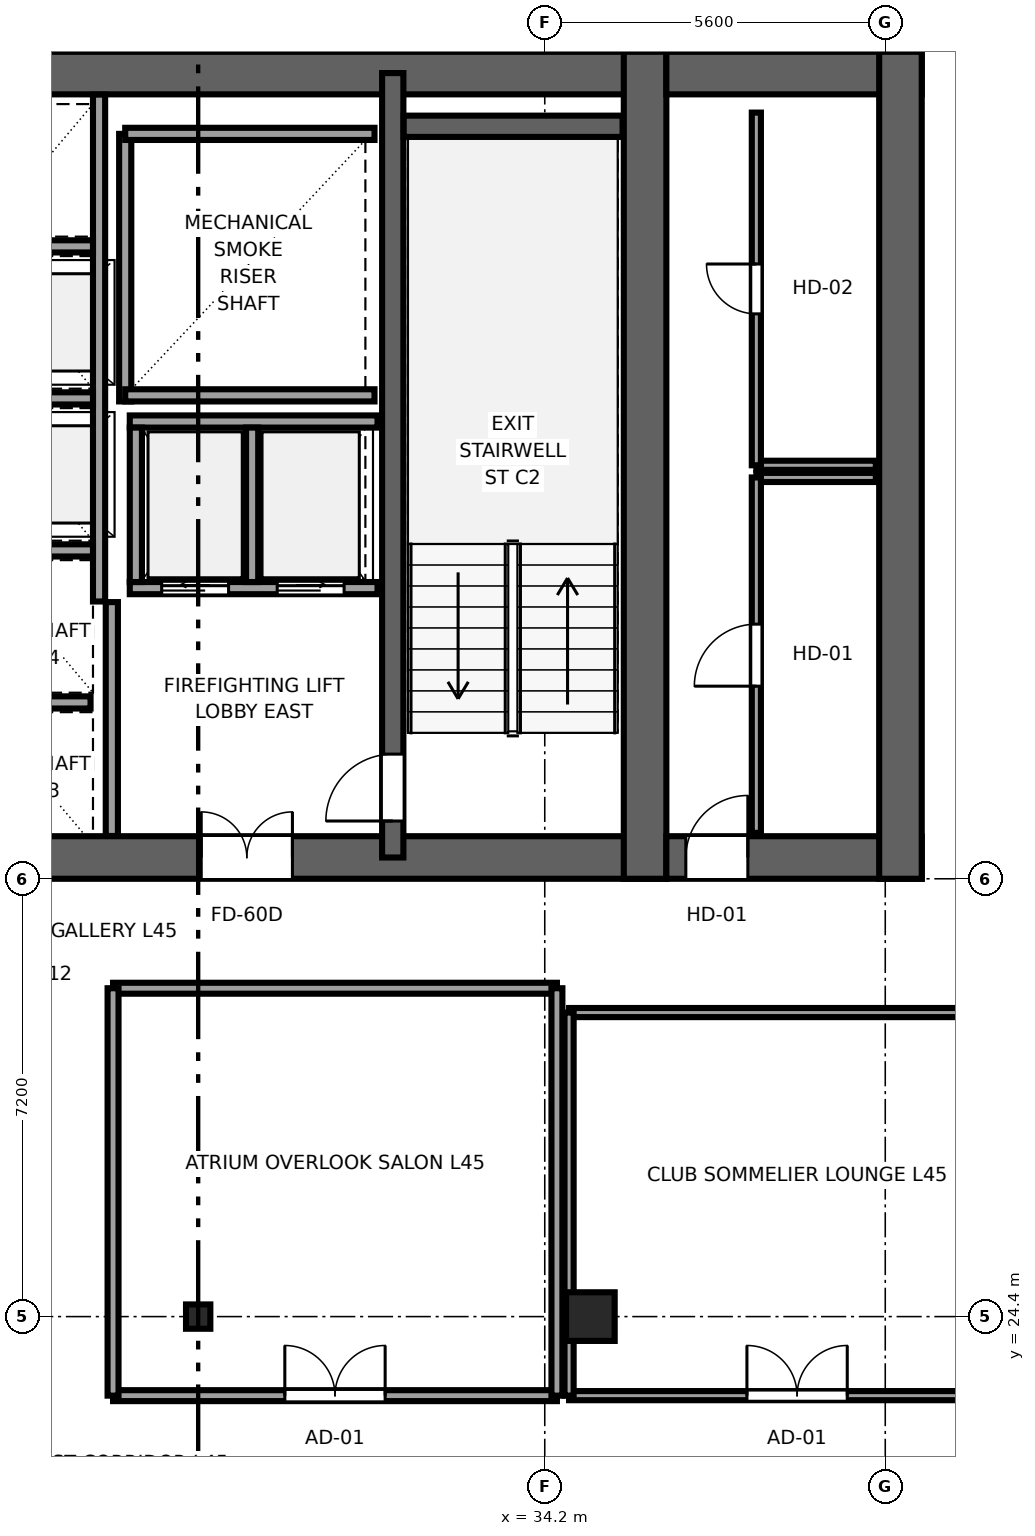
"""IFC4 building model, lengths in metres.
Left out: names, types, materials, properties, quantities, classifications, styles, units other than length and angle.
Written with IfcOpenShell. Run it as: python <this file> out.ifc"""

import sys

from ifc_helpers import new_model, si_unit, direction, frame, frame_2d, origin, origin_2d, place, context, subcontext, project, spatial, rectangle, i_section, extrude, source, transform, mapped, element, fill, save


model = new_model("IFC4")
c1 = context("Model", 3, precision=1e-05, world=origin(), true_north=direction((0.0, 1.0)))
c2 = subcontext(c1, "Body", "Model", "MODEL_VIEW")
j1 = project(units=[si_unit("LENGTHUNIT", "METRE"), si_unit("PLANEANGLEUNIT", "RADIAN")], contexts=[c1])
p1 = place(None, origin())
s1 = spatial("IfcSite", under=j1, at=p1, CompositionType="ELEMENT")
p2 = place(p1, origin())
s2 = spatial("IfcBuilding", under=s1, at=p2, CompositionType="ELEMENT")
p3 = place(p2, frame((0.0, 0.0, 171.9)))
s3 = spatial("IfcBuildingStorey", under=s2, at=p3, CompositionType="ELEMENT", Elevation=171.9)
p4 = place(p3, frame((9.8, 31.95, 0.0), z_axis=(0.0, 0.0, 1.0), x_axis=(1.0, 0.0, 0.0)))
e1 = element("IfcWall", 1, at=p4, inside=s3, PredefinedType="SHEAR", context=c2, shape_type="SweptSolid", body=[
    extrude(rectangle(XDim=26.4, YDim=0.7, at=frame_2d((13.2, 0.0))), origin(), (0.0, 0.0, 1.0), 3.55),
])
p5 = place(p4, frame((7.65, 0.0, 0.0), z_axis=(0.0, 0.0, 1.0), x_axis=(-1.0, 0.0, 0.0)))
e2 = element("IfcOpeningElement", 2, at=p5, cuts=e1, PredefinedType="OPENING", context=c2, shape_type="SweptSolid", body=[
    extrude(rectangle(XDim=1.5, YDim=2.04, at=frame_2d((0.75, 1.02))), frame((0.0, 0.36, 0.0), z_axis=(0.0, -1.0, 0.0), x_axis=(1.0, 0.0, 0.0)), (0.0, 0.0, 1.0), 0.72),
])
p6 = place(p4, frame((13.95, 0.0, 0.0), z_axis=(0.0, 0.0, 1.0), x_axis=(-1.0, 0.0, 0.0)))
e3 = element("IfcOpeningElement", 3, at=p6, cuts=e1, PredefinedType="OPENING", context=c2, shape_type="SweptSolid", body=[
    extrude(rectangle(XDim=1.5, YDim=2.04, at=frame_2d((0.75, 1.02))), frame((0.0, 0.36, 0.0), z_axis=(0.0, -1.0, 0.0), x_axis=(1.0, 0.0, 0.0)), (0.0, 0.0, 1.0), 0.72),
])
p7 = place(p4, frame((20.25, 0.0, 0.0), z_axis=(0.0, 0.0, 1.0), x_axis=(-1.0, 0.0, 0.0)))
e4 = element("IfcOpeningElement", 4, at=p7, cuts=e1, PredefinedType="OPENING", context=c2, shape_type="SweptSolid", body=[
    extrude(rectangle(XDim=1.5, YDim=2.04, at=frame_2d((0.75, 1.02))), frame((0.0, 0.36, 0.0), z_axis=(0.0, -1.0, 0.0), x_axis=(1.0, 0.0, 0.0)), (0.0, 0.0, 1.0), 0.72),
])
p8 = place(p3, frame((9.8, 44.85, 0.0), z_axis=(0.0, 0.0, 1.0), x_axis=(1.0, 0.0, 0.0)))
e5 = element("IfcWall", 5, at=p8, inside=s3, PredefinedType="SHEAR", context=c2, shape_type="SweptSolid", body=[
    extrude(rectangle(XDim=26.4, YDim=0.7, at=frame_2d((13.2, 0.0))), origin(), (0.0, 0.0, 1.0), 3.55),
])
p9 = place(p3, frame((35.85, 31.6, 0.0), z_axis=(0.0, 0.0, 1.0), x_axis=(0.0, 1.0, 0.0)))
e6 = element("IfcWall", 6, at=p9, inside=s3, PredefinedType="SHEAR", context=c2, shape_type="SweptSolid", body=[
    extrude(rectangle(XDim=13.6, YDim=0.7, at=frame_2d((6.8, 0.0))), origin(), (0.0, 0.0, 1.0), 3.55),
])
p10 = place(p3, frame((31.7, 31.95, 0.0), z_axis=(0.0, 0.0, 1.0), x_axis=(0.0, 1.0, 0.0)))
e7 = element("IfcWall", 7, at=p10, inside=s3, PredefinedType="SHEAR", context=c2, shape_type="SweptSolid", body=[
    extrude(rectangle(XDim=12.9, YDim=0.35, at=frame_2d((6.45, 0.0))), origin(), (0.0, 0.0, 1.0), 3.55),
])
p11 = place(p10, frame((1.7, 0.0, 0.0), z_axis=(0.0, 0.0, 1.0), x_axis=(-1.0, 0.0, 0.0)))
e8 = element("IfcOpeningElement", 8, at=p11, cuts=e7, PredefinedType="OPENING", context=c2, shape_type="SweptSolid", body=[
    extrude(rectangle(XDim=1.1, YDim=2.12, at=frame_2d((0.55, 1.06))), frame((0.0, 0.185, 0.0), z_axis=(0.0, -1.0, 0.0), x_axis=(1.0, 0.0, 0.0)), (0.0, 0.0, 1.0), 0.37),
])
p12 = place(p3, frame((36.2, 31.95, 0.0), z_axis=(0.0, 0.0, 1.0), x_axis=(1.0, 0.0, 0.0)))
e9 = element("IfcWall", 9, at=p12, inside=s3, PredefinedType="SHEAR", context=c2, shape_type="SweptSolid", body=[
    extrude(rectangle(XDim=4.2, YDim=0.7, at=frame_2d((2.1, 0.0))), origin(), (0.0, 0.0, 1.0), 3.55),
])
p13 = place(p12, frame((1.34, 0.0, 0.0), z_axis=(0.0, 0.0, 1.0), x_axis=(-1.0, 0.0, 0.0)))
e10 = element("IfcOpeningElement", 10, at=p13, cuts=e9, PredefinedType="OPENING", context=c2, shape_type="SweptSolid", body=[
    extrude(rectangle(XDim=1.02, YDim=2.03, at=frame_2d((0.51, 1.015))), frame((0.0, 0.36, 0.0), z_axis=(0.0, -1.0, 0.0), x_axis=(1.0, 0.0, 0.0)), (0.0, 0.0, 1.0), 0.72),
])
p14 = place(p3, frame((36.2, 44.85, 0.0), z_axis=(0.0, 0.0, 1.0), x_axis=(1.0, 0.0, 0.0)))
e11 = element("IfcWall", 11, at=p14, inside=s3, PredefinedType="SHEAR", context=c2, shape_type="SweptSolid", body=[
    extrude(rectangle(XDim=4.2, YDim=0.7, at=frame_2d((2.1, 0.0))), origin(), (0.0, 0.0, 1.0), 3.55),
])
p15 = place(p3, frame((40.05, 31.6, 0.0), z_axis=(0.0, 0.0, 1.0), x_axis=(0.0, 1.0, 0.0)))
e12 = element("IfcWall", 12, at=p15, inside=s3, PredefinedType="SHEAR", context=c2, shape_type="SweptSolid", body=[
    extrude(rectangle(XDim=13.6, YDim=0.7, at=frame_2d((6.8, 0.0))), origin(), (0.0, 0.0, 1.0), 3.55),
])
p16 = place(p3, frame((31.88, 43.975, 0.0), z_axis=(0.0, 0.0, 1.0), x_axis=(1.0, 0.0, 0.0)))
e13 = element("IfcWall", 13, at=p16, inside=s3, PredefinedType="SHEAR", context=c2, shape_type="SweptSolid", body=[
    extrude(rectangle(XDim=3.6, YDim=0.35, at=frame_2d((1.8, 0.0))), origin(), (0.0, 0.0, 1.0), 3.55),
])
m1 = source(origin(), c2, "Body", "SweptSolid", [
    extrude(rectangle(XDim=0.8, YDim=0.8, at=origin_2d()), origin(), (0.0, 0.0, 1.0), 3.55),
])
p17 = place(p3, frame((34.95, 24.4, 0.0), z_axis=(0.0, 0.0, 1.0), x_axis=(1.0, 0.0, 0.0)))
e14 = element("IfcColumn", 14, at=p17, inside=s3, PredefinedType="COLUMN", context=c2, shape_type="MappedRepresentation", body=[
    mapped(m1, transform((0.0, 0.0, 0.0), x_axis=(1.0, 0.0, 0.0), y_axis=(0.0, 1.0, 0.0), z_axis=(0.0, 0.0, 1.0), scale=1.0)),
])
m2 = source(origin(), c2, "Body", "SweptSolid", [
    extrude(i_section(OverallWidth=0.4, OverallDepth=0.4, WebThickness=0.02, FlangeThickness=0.035, at=origin_2d()), origin(), (0.0, 0.0, 1.0), 3.55),
])
p18 = place(p3, frame((28.5, 24.4, 0.0), z_axis=(0.0, 0.0, 1.0), x_axis=(1.0, 0.0, 0.0)))
e15 = element("IfcColumn", 15, at=p18, inside=s3, PredefinedType="COLUMN", context=c2, shape_type="MappedRepresentation", body=[
    mapped(m2, transform((0.0, 0.0, 0.0), x_axis=(1.0, 0.0, 0.0), y_axis=(0.0, 1.0, 0.0), z_axis=(0.0, 0.0, 1.0), scale=1.0)),
])
p19 = place(p3, frame((27.3, 39.45, 0.0), z_axis=(0.0, 0.0, 1.0), x_axis=(0.0, 1.0, 0.0)))
e16 = element("IfcWall", 16, at=p19, inside=s3, PredefinedType="SOLIDWALL", context=c2, shape_type="SweptSolid", body=[
    extrude(rectangle(XDim=4.4, YDim=0.2, at=frame_2d((2.2, 0.0))), origin(), (0.0, 0.0, 1.0), 3.37),
])
for number, where, z_axis, x_axis in (
    (17, (27.3, 39.55, 0.0), (0.0, 0.0, 1.0), (1.0, 0.0, 0.0)),
    (18, (27.3, 43.85, 0.0), (0.0, 0.0, 1.0), (1.0, 0.0, 0.0)),
):
    element("IfcWall", number, at=place(p3, frame(where, z_axis=z_axis, x_axis=x_axis)), inside=s3, PredefinedType="SOLIDWALL", context=c2, shape_type="SweptSolid", body=[
        extrude(rectangle(XDim=4.1, YDim=0.2, at=frame_2d((2.05, 0.0))), origin(), (0.0, 0.0, 1.0), 3.37),
    ])
p20 = place(p3, frame((27.08, 32.304, 0.0), z_axis=(0.0, 0.0, 1.0), x_axis=(0.0, 1.0, 0.0)))
e19 = element("IfcWall", 19, at=p20, inside=s3, PredefinedType="SOLIDWALL", context=c2, shape_type="SweptSolid", body=[
    extrude(rectangle(XDim=3.846, YDim=0.2, at=frame_2d((1.923, 0.0))), origin(), (0.0, 0.0, 1.0), 3.37),
])
p21 = place(p3, frame((27.375, 36.38, 0.0), z_axis=(0.0, 0.0, 1.0), x_axis=(1.0, 0.0, 0.0)))
e20 = element("IfcWall", 20, at=p21, inside=s3, PredefinedType="SOLIDWALL", context=c2, shape_type="SweptSolid", body=[
    extrude(rectangle(XDim=4.075, YDim=0.2, at=frame_2d((2.038, 0.0))), origin(), (0.0, 0.0, 1.0), 3.37),
])
p22 = place(p21, frame((0.525, 0.0, 0.0)))
e21 = element("IfcOpeningElement", 21, at=p22, cuts=e20, PredefinedType="OPENING", context=c2, shape_type="SweptSolid", body=[
    extrude(rectangle(XDim=1.1, YDim=2.12, at=frame_2d((0.55, 1.06))), frame((0.0, 0.11, 0.0), z_axis=(0.0, -1.0, 0.0), x_axis=(1.0, 0.0, 0.0)), (0.0, 0.0, 1.0), 0.22),
])
p23 = place(p21, frame((2.425, 0.0, 0.0)))
e22 = element("IfcOpeningElement", 22, at=p23, cuts=e20, PredefinedType="OPENING", context=c2, shape_type="SweptSolid", body=[
    extrude(rectangle(XDim=1.1, YDim=2.12, at=frame_2d((0.55, 1.06))), frame((0.0, 0.11, 0.0), z_axis=(0.0, -1.0, 0.0), x_axis=(1.0, 0.0, 0.0)), (0.0, 0.0, 1.0), 0.22),
])
p24 = place(p3, frame((27.375, 39.12, 0.0), z_axis=(0.0, 0.0, 1.0), x_axis=(1.0, 0.0, 0.0)))
e23 = element("IfcWall", 23, at=p24, inside=s3, PredefinedType="SOLIDWALL", context=c2, shape_type="SweptSolid", body=[
    extrude(rectangle(XDim=4.075, YDim=0.2, at=frame_2d((2.038, 0.0))), origin(), (0.0, 0.0, 1.0), 3.37),
])
for number, where, z_axis, x_axis in (
    (24, (27.475, 36.48, 0.0), (0.0, 0.0, 1.0), (0.0, 1.0, 0.0)),
    (25, (29.387, 36.48, 0.0), (0.0, 0.0, 1.0), (0.0, 1.0, 0.0)),
):
    element("IfcWall", number, at=place(p3, frame(where, z_axis=z_axis, x_axis=x_axis)), inside=s3, PredefinedType="SOLIDWALL", context=c2, shape_type="SweptSolid", body=[
        extrude(rectangle(XDim=2.54, YDim=0.2, at=frame_2d((1.27, 0.0))), origin(), (0.0, 0.0, 1.0), 3.37),
    ])
p25 = place(p3, frame((26.87, 36.16, 0.0), z_axis=(0.0, 0.0, 1.0), x_axis=(0.0, 1.0, 0.0)))
e26 = element("IfcWall", 26, at=p25, inside=s3, PredefinedType="SOLIDWALL", context=c2, shape_type="SweptSolid", body=[
    extrude(rectangle(XDim=8.336, YDim=0.2, at=frame_2d((4.168, 0.0))), origin(), (0.0, 0.0, 1.0), 3.37),
])
p26 = place(p3, frame((24.93, 34.5, 0.0), z_axis=(0.0, 0.0, 1.0), x_axis=(1.0, 0.0, 0.0)))
e27 = element("IfcWall", 27, at=p26, inside=s3, PredefinedType="SOLIDWALL", context=c2, shape_type="SweptSolid", body=[
    extrude(rectangle(XDim=1.8, YDim=0.2, at=frame_2d((0.9, 0.0))), origin(), (0.0, 0.0, 1.0), 3.37),
])
for number, where, z_axis, x_axis in (
    (28, (24.93, 37.0, 0.0), (0.0, 0.0, 1.0), (1.0, 0.0, 0.0)),
    (29, (24.93, 39.5, 0.0), (0.0, 0.0, 1.0), (1.0, 0.0, 0.0)),
    (30, (24.93, 42.0, 0.0), (0.0, 0.0, 1.0), (1.0, 0.0, 0.0)),
):
    element("IfcWall", number, at=place(p3, frame(where, z_axis=z_axis, x_axis=x_axis)), inside=s3, PredefinedType="SOLIDWALL", context=c2, shape_type="SweptSolid", body=[
        extrude(rectangle(XDim=1.84, YDim=0.2, at=frame_2d((0.92, 0.0))), origin(), (0.0, 0.0, 1.0), 3.37),
    ])
p27 = place(p3, frame((37.68, 38.2, 0.0), z_axis=(0.0, 0.0, 1.0), x_axis=(1.0, 0.0, 0.0)))
e31 = element("IfcWall", 31, at=p27, inside=s3, PredefinedType="PARTITIONING", context=c2, shape_type="SweptSolid", body=[
    extrude(rectangle(XDim=1.965, YDim=0.15, at=frame_2d((0.982, 0.0))), origin(), (0.0, 0.0, 1.0), 3.37),
])
p28 = place(p3, frame((37.68, 32.355, 0.0), z_axis=(0.0, 0.0, 1.0), x_axis=(0.0, 1.0, 0.0)))
e32 = element("IfcWall", 32, at=p28, inside=s3, PredefinedType="PARTITIONING", context=c2, shape_type="SweptSolid", body=[
    extrude(rectangle(XDim=5.845, YDim=0.15, at=frame_2d((2.922, 0.0))), origin(), (0.0, 0.0, 1.0), 3.37),
])
p29 = place(p28, frame((2.413, 0.0, 0.0)))
e33 = element("IfcOpeningElement", 33, at=p29, cuts=e32, PredefinedType="OPENING", context=c2, shape_type="SweptSolid", body=[
    extrude(rectangle(XDim=1.02, YDim=2.03, at=frame_2d((0.51, 1.015))), frame((0.0, 0.085, 0.0), z_axis=(0.0, -1.0, 0.0), x_axis=(1.0, 0.0, 0.0)), (0.0, 0.0, 1.0), 0.17),
])
p30 = place(p3, frame((37.68, 38.4, 0.0), z_axis=(0.0, 0.0, 1.0), x_axis=(1.0, 0.0, 0.0)))
e34 = element("IfcWall", 34, at=p30, inside=s3, PredefinedType="PARTITIONING", context=c2, shape_type="SweptSolid", body=[
    extrude(rectangle(XDim=1.965, YDim=0.15, at=frame_2d((0.982, 0.0))), origin(), (0.0, 0.0, 1.0), 3.37),
])
p31 = place(p3, frame((37.68, 38.4, 0.0), z_axis=(0.0, 0.0, 1.0), x_axis=(0.0, 1.0, 0.0)))
e35 = element("IfcWall", 35, at=p31, inside=s3, PredefinedType="PARTITIONING", context=c2, shape_type="SweptSolid", body=[
    extrude(rectangle(XDim=5.8, YDim=0.15, at=frame_2d((2.9, 0.0))), origin(), (0.0, 0.0, 1.0), 3.37),
])
p32 = place(p31, frame((2.49, 0.0, 0.0)))
e36 = element("IfcOpeningElement", 36, at=p32, cuts=e35, PredefinedType="OPENING", context=c2, shape_type="SweptSolid", body=[
    extrude(rectangle(XDim=0.82, YDim=2.01, at=frame_2d((0.41, 1.005))), frame((0.0, 0.085, 0.0), z_axis=(0.0, -1.0, 0.0), x_axis=(1.0, 0.0, 0.0)), (0.0, 0.0, 1.0), 0.17),
])
p33 = place(p3, frame((27.1, 23.1, 0.0), z_axis=(0.0, 0.0, 1.0), x_axis=(1.0, 0.0, 0.0)))
e37 = element("IfcWall", 37, at=p33, inside=s3, PredefinedType="PARTITIONING", context=c2, shape_type="SweptSolid", body=[
    extrude(rectangle(XDim=7.3, YDim=0.18, at=frame_2d((3.65, 0.0))), origin(), (0.0, 0.0, 1.0), 3.37),
])
p34 = place(p33, frame((2.825, 0.0, 0.0)))
e38 = element("IfcOpeningElement", 38, at=p34, cuts=e37, PredefinedType="OPENING", context=c2, shape_type="SweptSolid", body=[
    extrude(rectangle(XDim=1.65, YDim=2.15, at=frame_2d((0.825, 1.075))), frame((0.0, 0.1, 0.0), z_axis=(0.0, -1.0, 0.0), x_axis=(1.0, 0.0, 0.0)), (0.0, 0.0, 1.0), 0.2),
])
p35 = place(p3, frame((27.1, 29.8, 0.0), z_axis=(0.0, 0.0, 1.0), x_axis=(1.0, 0.0, 0.0)))
e39 = element("IfcWall", 39, at=p35, inside=s3, PredefinedType="PARTITIONING", context=c2, shape_type="SweptSolid", body=[
    extrude(rectangle(XDim=7.3, YDim=0.18, at=frame_2d((3.65, 0.0))), origin(), (0.0, 0.0, 1.0), 3.37),
])
for number, where, z_axis, x_axis in (
    (40, (27.1, 23.1, 0.0), (0.0, 0.0, 1.0), (0.0, 1.0, 0.0)),
    (41, (34.4, 23.1, 0.0), (0.0, 0.0, 1.0), (0.0, 1.0, 0.0)),
):
    element("IfcWall", number, at=place(p3, frame(where, z_axis=z_axis, x_axis=x_axis)), inside=s3, PredefinedType="PARTITIONING", context=c2, shape_type="SweptSolid", body=[
        extrude(rectangle(XDim=6.7, YDim=0.18, at=frame_2d((3.35, 0.0))), origin(), (0.0, 0.0, 1.0), 3.37),
    ])
p36 = place(p3, frame((34.6, 23.1, 0.0), z_axis=(0.0, 0.0, 1.0), x_axis=(1.0, 0.0, 0.0)))
e42 = element("IfcWall", 42, at=p36, inside=s3, PredefinedType="PARTITIONING", context=c2, shape_type="SweptSolid", body=[
    extrude(rectangle(XDim=7.5, YDim=0.15, at=frame_2d((3.75, 0.0))), origin(), (0.0, 0.0, 1.0), 3.37),
])
p37 = place(p36, frame((2.925, 0.0, 0.0)))
e43 = element("IfcOpeningElement", 43, at=p37, cuts=e42, PredefinedType="OPENING", context=c2, shape_type="SweptSolid", body=[
    extrude(rectangle(XDim=1.65, YDim=2.15, at=frame_2d((0.825, 1.075))), frame((0.0, 0.085, 0.0), z_axis=(0.0, -1.0, 0.0), x_axis=(1.0, 0.0, 0.0)), (0.0, 0.0, 1.0), 0.17),
])
p38 = place(p3, frame((34.6, 29.4, 0.0), z_axis=(0.0, 0.0, 1.0), x_axis=(1.0, 0.0, 0.0)))
e44 = element("IfcWall", 44, at=p38, inside=s3, PredefinedType="PARTITIONING", context=c2, shape_type="SweptSolid", body=[
    extrude(rectangle(XDim=7.5, YDim=0.15, at=frame_2d((3.75, 0.0))), origin(), (0.0, 0.0, 1.0), 3.37),
])
p39 = place(p3, frame((34.6, 23.1, 0.0), z_axis=(0.0, 0.0, 1.0), x_axis=(0.0, 1.0, 0.0)))
e45 = element("IfcWall", 45, at=p39, inside=s3, PredefinedType="PARTITIONING", context=c2, shape_type="SweptSolid", body=[
    extrude(rectangle(XDim=6.3, YDim=0.15, at=frame_2d((3.15, 0.0))), origin(), (0.0, 0.0, 1.0), 3.37),
])
m3 = source(origin(), c2, "Body", "SweptSolid", [
    extrude(rectangle(XDim=1.1, YDim=2.12, at=frame_2d((0.55, 1.06))), frame((0.0, 0.025, 0.0), z_axis=(0.0, -1.0, 0.0), x_axis=(1.0, 0.0, 0.0)), (0.0, 0.0, 1.0), 0.05),
])
p40 = place(p11, origin())
e46 = element("IfcDoor", 46, at=p40, inside=s3, OperationType="SINGLE_SWING_LEFT", PredefinedType="DOOR", context=c2, shape_type="MappedRepresentation", body=[
    mapped(m3, transform((0.0, 0.0, 0.0), x_axis=(1.0, 0.0, 0.0), y_axis=(0.0, 1.0, 0.0), z_axis=(0.0, 0.0, 1.0), scale=1.0)),
])
fill(e8, e46)
m4 = source(origin(), c2, "Body", "SweptSolid", [
    extrude(rectangle(XDim=1.5, YDim=2.04, at=frame_2d((0.75, 1.02))), frame((0.0, 0.025, 0.0), z_axis=(0.0, -1.0, 0.0), x_axis=(1.0, 0.0, 0.0)), (0.0, 0.0, 1.0), 0.05),
])
p41 = place(p7, origin())
e47 = element("IfcDoor", 47, at=p41, inside=s3, OperationType="DOUBLE_DOOR_SINGLE_SWING", PredefinedType="DOOR", context=c2, shape_type="MappedRepresentation", body=[
    mapped(m4, transform((0.0, 0.0, 0.0), x_axis=(1.0, 0.0, 0.0), y_axis=(0.0, 1.0, 0.0), z_axis=(0.0, 0.0, 1.0), scale=1.0)),
])
fill(e4, e47)
m5 = source(origin(), c2, "Body", "SweptSolid", [
    extrude(rectangle(XDim=1.02, YDim=2.03, at=frame_2d((0.51, 1.015))), frame((0.0, 0.025, 0.0), z_axis=(0.0, -1.0, 0.0), x_axis=(1.0, 0.0, 0.0)), (0.0, 0.0, 1.0), 0.05),
])
p42 = place(p13, origin())
e48 = element("IfcDoor", 48, at=p42, inside=s3, OperationType="SINGLE_SWING_RIGHT", PredefinedType="DOOR", context=c2, shape_type="MappedRepresentation", body=[
    mapped(m5, transform((0.0, 0.0, 0.0), x_axis=(1.0, 0.0, 0.0), y_axis=(0.0, 1.0, 0.0), z_axis=(0.0, 0.0, 1.0), scale=1.0)),
])
fill(e10, e48)
m6 = source(origin(), c2, "Body", "SweptSolid", [
    extrude(rectangle(XDim=1.1, YDim=2.12, at=frame_2d((0.55, 1.06))), frame((0.0, 0.025, 0.0), z_axis=(0.0, -1.0, 0.0), x_axis=(1.0, 0.0, 0.0)), (0.0, 0.0, 1.0), 0.05),
])
p43 = place(p22, origin())
e49 = element("IfcDoor", 49, at=p43, inside=s3, OperationType="SLIDING_TO_LEFT", PredefinedType="DOOR", context=c2, shape_type="MappedRepresentation", body=[
    mapped(m6, transform((0.0, 0.0, 0.0), x_axis=(1.0, 0.0, 0.0), y_axis=(0.0, 1.0, 0.0), z_axis=(0.0, 0.0, 1.0), scale=1.0)),
])
fill(e21, e49)
p44 = place(p23, origin())
e50 = element("IfcDoor", 50, at=p44, inside=s3, OperationType="SLIDING_TO_RIGHT", PredefinedType="DOOR", context=c2, shape_type="MappedRepresentation", body=[
    mapped(m6, transform((0.0, 0.0, 0.0), x_axis=(1.0, 0.0, 0.0), y_axis=(0.0, 1.0, 0.0), z_axis=(0.0, 0.0, 1.0), scale=1.0)),
])
fill(e22, e50)
p45 = place(p29, origin())
e51 = element("IfcDoor", 51, at=p45, inside=s3, OperationType="SINGLE_SWING_LEFT", PredefinedType="DOOR", context=c2, shape_type="MappedRepresentation", body=[
    mapped(m5, transform((0.0, 0.0, 0.0), x_axis=(1.0, 0.0, 0.0), y_axis=(0.0, 1.0, 0.0), z_axis=(0.0, 0.0, 1.0), scale=1.0)),
])
fill(e33, e51)
m7 = source(origin(), c2, "Body", "SweptSolid", [
    extrude(rectangle(XDim=0.82, YDim=2.01, at=frame_2d((0.41, 1.005))), frame((0.0, 0.025, 0.0), z_axis=(0.0, -1.0, 0.0), x_axis=(1.0, 0.0, 0.0)), (0.0, 0.0, 1.0), 0.05),
])
p46 = place(p32, origin())
e52 = element("IfcDoor", 52, at=p46, inside=s3, OperationType="SINGLE_SWING_RIGHT", PredefinedType="DOOR", context=c2, shape_type="MappedRepresentation", body=[
    mapped(m7, transform((0.0, 0.0, 0.0), x_axis=(1.0, 0.0, 0.0), y_axis=(0.0, 1.0, 0.0), z_axis=(0.0, 0.0, 1.0), scale=1.0)),
])
fill(e36, e52)
m8 = source(origin(), c2, "Body", "SweptSolid", [
    extrude(rectangle(XDim=1.65, YDim=2.15, at=frame_2d((0.825, 1.075))), frame((0.0, 0.025, 0.0), z_axis=(0.0, -1.0, 0.0), x_axis=(1.0, 0.0, 0.0)), (0.0, 0.0, 1.0), 0.05),
])
p47 = place(p34, origin())
e53 = element("IfcDoor", 53, at=p47, inside=s3, OperationType="DOUBLE_DOOR_SINGLE_SWING", PredefinedType="DOOR", context=c2, shape_type="MappedRepresentation", body=[
    mapped(m8, transform((0.0, 0.0, 0.0), x_axis=(1.0, 0.0, 0.0), y_axis=(0.0, 1.0, 0.0), z_axis=(0.0, 0.0, 1.0), scale=1.0)),
])
fill(e38, e53)
p48 = place(p37, origin())
e54 = element("IfcDoor", 54, at=p48, inside=s3, OperationType="DOUBLE_DOOR_SINGLE_SWING", PredefinedType="DOOR", context=c2, shape_type="MappedRepresentation", body=[
    mapped(m8, transform((0.0, 0.0, 0.0), x_axis=(1.0, 0.0, 0.0), y_axis=(0.0, 1.0, 0.0), z_axis=(0.0, 0.0, 1.0), scale=1.0)),
])
fill(e43, e54)
save(model, sys.argv[1])
